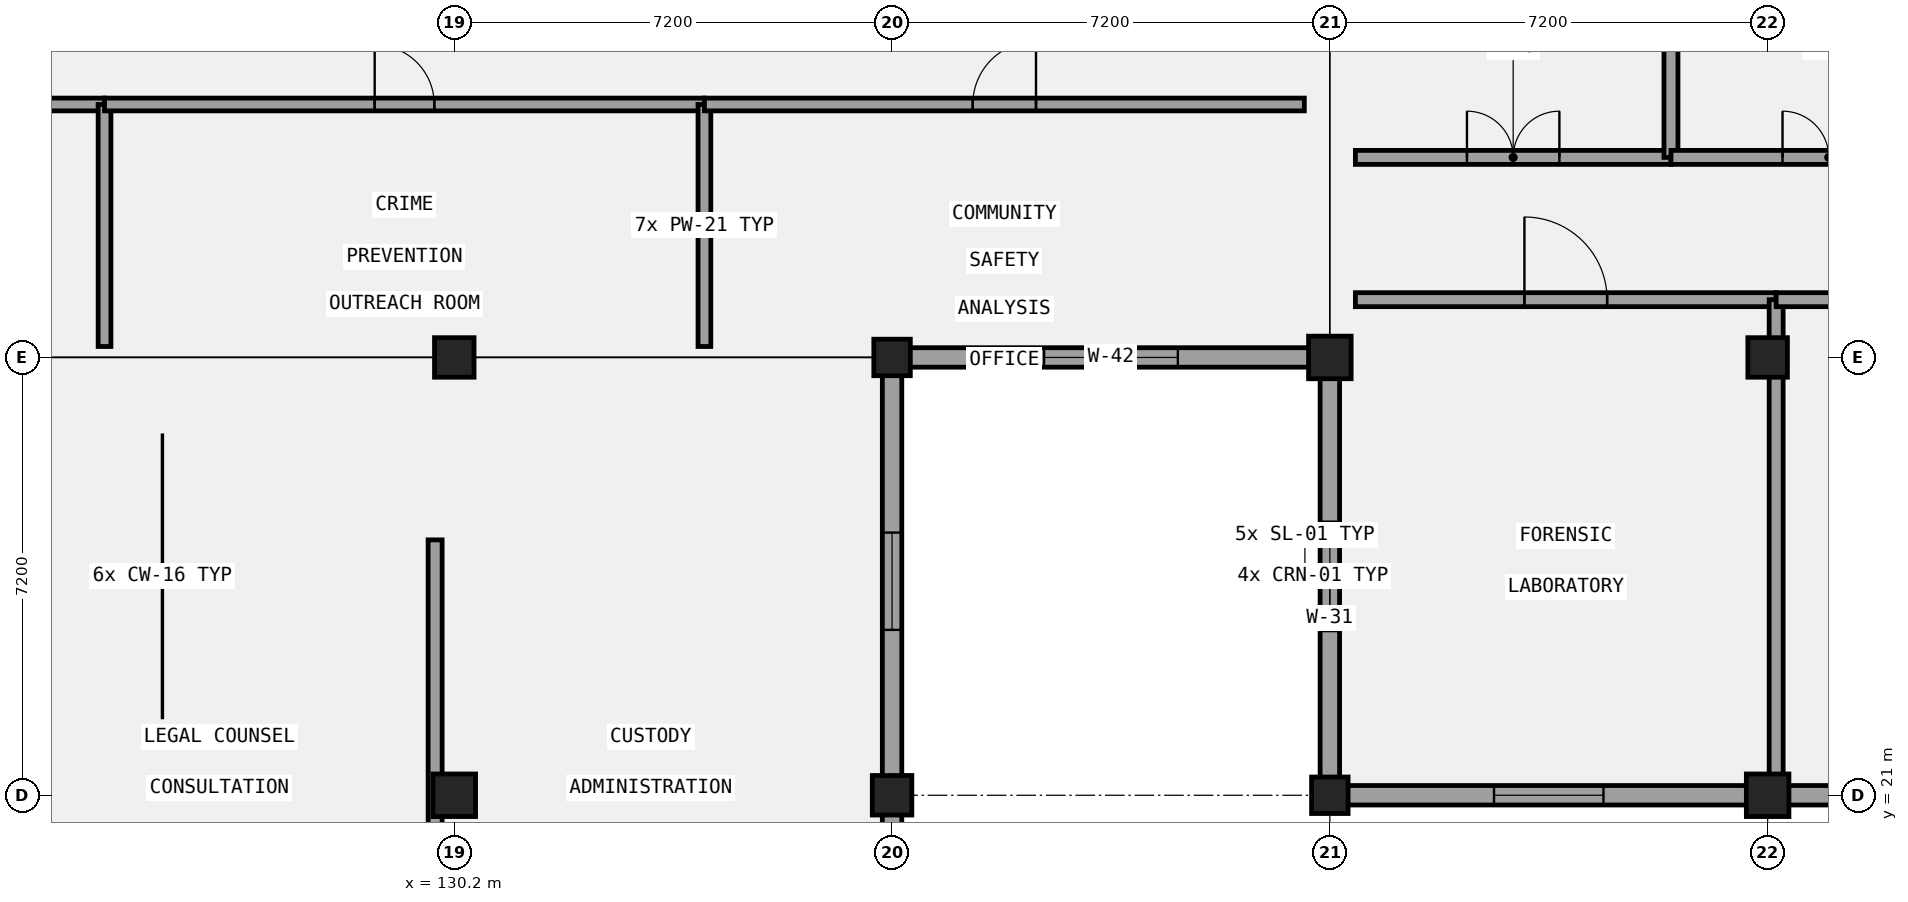
"""IFC4 building model, lengths in metres.
Left out: names, types, materials, properties, quantities, classifications, styles, units other than length and angle.
Written with IfcOpenShell. Run it as: python <this file> out.ifc"""

import sys

from ifc_helpers import new_model, si_unit, direction, frame, frame_2d, origin, origin_2d, place, context, subcontext, project, spatial, rectangle, extrude, element, fill, save


model = new_model("IFC4")
c1 = context("Model", 3, precision=1e-05, world=origin(), true_north=direction((0.0, 1.0)))
c2 = subcontext(c1, "Body", "Model", "MODEL_VIEW")
j1 = project(units=[si_unit("LENGTHUNIT", "METRE"), si_unit("PLANEANGLEUNIT", "RADIAN")], contexts=[c1])
p1 = place(None, origin())
s1 = spatial("IfcSite", under=j1, at=p1, CompositionType="ELEMENT")
p2 = place(p1, origin())
s2 = spatial("IfcBuilding", under=s1, at=p2, CompositionType="ELEMENT")
p3 = place(p2, frame((0.0, 0.0, 9.6)))
s3 = spatial("IfcBuildingStorey", under=s2, at=p3, CompositionType="ELEMENT", Elevation=9.6)
p4 = place(p3, frame((130.2, 21.0, 0.0), z_axis=(0.0, 0.0, 1.0), x_axis=(1.0, 0.0, 0.0)))
e1 = element("IfcColumn", 1, at=p4, inside=s3, PredefinedType="COLUMN", context=c2, shape_type="SweptSolid", body=[
    extrude(rectangle(XDim=0.7, YDim=0.7, at=origin_2d()), origin(), (0.0, 0.0, 1.0), 4.2),
])
for number, where, z_axis, x_axis in (
    (2, (130.2, 28.2, 0.0), (0.0, 0.0, 1.0), (1.0, 0.0, 0.0)),
    (3, (137.4, 21.0, 0.0), (0.0, 0.0, 1.0), (1.0, 0.0, 0.0)),
):
    element("IfcColumn", number, at=place(p3, frame(where, z_axis=z_axis, x_axis=x_axis)), inside=s3, PredefinedType="COLUMN", context=c2, shape_type="SweptSolid", body=[
        extrude(rectangle(XDim=0.65, YDim=0.65, at=origin_2d()), origin(), (0.0, 0.0, 1.0), 4.2),
    ])
for number, where, z_axis, x_axis in (
    (4, (137.4, 28.2, 0.0), (0.0, 0.0, 1.0), (1.0, 0.0, 0.0)),
    (5, (144.6, 21.0, 0.0), (0.0, 0.0, 1.0), (1.0, 0.0, 0.0)),
):
    element("IfcColumn", number, at=place(p3, frame(where, z_axis=z_axis, x_axis=x_axis)), inside=s3, PredefinedType="COLUMN", context=c2, shape_type="SweptSolid", body=[
        extrude(rectangle(XDim=0.6, YDim=0.6, at=origin_2d()), origin(), (0.0, 0.0, 1.0), 4.2),
    ])
for number, where, z_axis, x_axis in (
    (6, (144.6, 28.2, 0.0), (0.0, 0.0, 1.0), (1.0, 0.0, 0.0)),
    (7, (151.8, 21.0, 0.0), (0.0, 0.0, 1.0), (1.0, 0.0, 0.0)),
):
    element("IfcColumn", number, at=place(p3, frame(where, z_axis=z_axis, x_axis=x_axis)), inside=s3, PredefinedType="COLUMN", context=c2, shape_type="SweptSolid", body=[
        extrude(rectangle(XDim=0.7, YDim=0.7, at=origin_2d()), origin(), (0.0, 0.0, 1.0), 4.2),
    ])
p5 = place(p3, frame((151.8, 28.2, 0.0), z_axis=(0.0, 0.0, 1.0), x_axis=(1.0, 0.0, 0.0)))
e8 = element("IfcColumn", 8, at=p5, inside=s3, PredefinedType="COLUMN", context=c2, shape_type="SweptSolid", body=[
    extrude(rectangle(XDim=0.65, YDim=0.65, at=origin_2d()), origin(), (0.0, 0.0, 1.0), 4.2),
])
p6 = place(p3, frame((137.4, 6.76, 0.0), z_axis=(0.0, 0.0, 1.0), x_axis=(0.0, 1.0, 0.0)))
e9 = element("IfcWall", 9, at=p6, inside=s3, PredefinedType="SOLIDWALL", context=c2, shape_type="SweptSolid", body=[
    extrude(rectangle(XDim=21.28, YDim=0.32, at=frame_2d((10.64, 0.0))), origin(), (0.0, 0.0, 1.0), 3.29),
])
p7 = place(p6, frame((2.72, 0.0, 1.0)))
e10 = element("IfcOpeningElement", 10, at=p7, cuts=e9, PredefinedType="OPENING", context=c2, shape_type="SweptSolid", body=[
    extrude(rectangle(XDim=1.6, YDim=1.65, at=frame_2d((0.8, 0.825))), frame((0.0, 0.17, 0.0), z_axis=(0.0, -1.0, 0.0), x_axis=(1.0, 0.0, 0.0)), (0.0, 0.0, 1.0), 0.34),
])
p8 = place(p6, frame((9.84, 0.0, 1.0)))
e11 = element("IfcOpeningElement", 11, at=p8, cuts=e9, PredefinedType="OPENING", context=c2, shape_type="SweptSolid", body=[
    extrude(rectangle(XDim=1.6, YDim=1.65, at=frame_2d((0.8, 0.825))), frame((0.0, 0.17, 0.0), z_axis=(0.0, -1.0, 0.0), x_axis=(1.0, 0.0, 0.0)), (0.0, 0.0, 1.0), 0.34),
])
p9 = place(p6, frame((16.96, 0.0, 1.0)))
e12 = element("IfcOpeningElement", 12, at=p9, cuts=e9, PredefinedType="OPENING", context=c2, shape_type="SweptSolid", body=[
    extrude(rectangle(XDim=1.6, YDim=1.65, at=frame_2d((0.8, 0.825))), frame((0.0, 0.17, 0.0), z_axis=(0.0, -1.0, 0.0), x_axis=(1.0, 0.0, 0.0)), (0.0, 0.0, 1.0), 0.34),
])
p10 = place(p3, frame((137.24, 28.2, 0.0), z_axis=(0.0, 0.0, 1.0), x_axis=(1.0, 0.0, 0.0)))
e13 = element("IfcWall", 13, at=p10, inside=s3, PredefinedType="SOLIDWALL", context=c2, shape_type="SweptSolid", body=[
    extrude(rectangle(XDim=7.52, YDim=0.32, at=frame_2d((3.76, 0.0))), origin(), (0.0, 0.0, 1.0), 2.94),
])
p11 = place(p10, frame((2.66, 0.0, 1.0)))
e14 = element("IfcOpeningElement", 14, at=p11, cuts=e13, PredefinedType="OPENING", context=c2, shape_type="SweptSolid", body=[
    extrude(rectangle(XDim=2.2, YDim=1.65, at=frame_2d((1.1, 0.825))), frame((0.0, 0.17, 0.0), z_axis=(0.0, -1.0, 0.0), x_axis=(1.0, 0.0, 0.0)), (0.0, 0.0, 1.0), 0.34),
])
p12 = place(p3, frame((144.6, 28.04, 0.0), z_axis=(0.0, 0.0, 1.0), x_axis=(0.0, -1.0, 0.0)))
e15 = element("IfcWall", 15, at=p12, inside=s3, PredefinedType="SOLIDWALL", context=c2, shape_type="SweptSolid", body=[
    extrude(rectangle(XDim=6.88, YDim=0.32, at=frame_2d((3.44, 0.0))), origin(), (0.0, 0.0, 1.0), 3.19),
])
p13 = place(p12, frame((2.54, 0.0, 1.0)))
e16 = element("IfcOpeningElement", 16, at=p13, cuts=e15, PredefinedType="OPENING", context=c2, shape_type="SweptSolid", body=[
    extrude(rectangle(XDim=1.8, YDim=1.4, at=frame_2d((0.9, 0.7))), frame((0.0, 0.17, 0.0), z_axis=(0.0, -1.0, 0.0), x_axis=(1.0, 0.0, 0.0)), (0.0, 0.0, 1.0), 0.34),
])
p14 = place(p3, frame((144.44, 21.0, 0.0), z_axis=(0.0, 0.0, 1.0), x_axis=(1.0, 0.0, 0.0)))
e17 = element("IfcWall", 17, at=p14, inside=s3, PredefinedType="SOLIDWALL", context=c2, shape_type="SweptSolid", body=[
    extrude(rectangle(XDim=21.92, YDim=0.32, at=frame_2d((10.96, 0.0))), origin(), (0.0, 0.0, 1.0), 3.29),
])
p15 = place(p14, frame((2.86, 0.0, 1.0)))
e18 = element("IfcOpeningElement", 18, at=p15, cuts=e17, PredefinedType="OPENING", context=c2, shape_type="SweptSolid", body=[
    extrude(rectangle(XDim=1.8, YDim=1.65, at=frame_2d((0.9, 0.825))), frame((0.0, 0.17, 0.0), z_axis=(0.0, -1.0, 0.0), x_axis=(1.0, 0.0, 0.0)), (0.0, 0.0, 1.0), 0.34),
])
p16 = place(p14, frame((10.06, 0.0, 1.0)))
e19 = element("IfcOpeningElement", 19, at=p16, cuts=e17, PredefinedType="OPENING", context=c2, shape_type="SweptSolid", body=[
    extrude(rectangle(XDim=1.8, YDim=1.65, at=frame_2d((0.9, 0.825))), frame((0.0, 0.17, 0.0), z_axis=(0.0, -1.0, 0.0), x_axis=(1.0, 0.0, 0.0)), (0.0, 0.0, 1.0), 0.34),
])
p17 = place(p14, frame((17.26, 0.0, 1.0)))
e20 = element("IfcOpeningElement", 20, at=p17, cuts=e17, PredefinedType="OPENING", context=c2, shape_type="SweptSolid", body=[
    extrude(rectangle(XDim=1.8, YDim=1.65, at=frame_2d((0.9, 0.825))), frame((0.0, 0.17, 0.0), z_axis=(0.0, -1.0, 0.0), x_axis=(1.0, 0.0, 0.0)), (0.0, 0.0, 1.0), 0.34),
])
p18 = place(p3, frame((114.582, 32.36, 0.0), z_axis=(0.0, 0.0, 1.0), x_axis=(1.0, 0.0, 0.0)))
e21 = element("IfcWall", 21, at=p18, inside=s3, PredefinedType="PARTITIONING", context=c2, shape_type="SweptSolid", body=[
    extrude(rectangle(XDim=9.866, YDim=0.21, at=frame_2d((4.933, 0.0))), origin(), (0.0, 0.0, 1.0), 3.94),
])
p19 = place(p18, frame((4.443, 0.0, 0.0)))
e22 = element("IfcOpeningElement", 22, at=p19, cuts=e21, PredefinedType="OPENING", context=c2, shape_type="SweptSolid", body=[
    extrude(rectangle(XDim=0.98, YDim=2.22, at=frame_2d((0.49, 1.11))), frame((0.0, 0.115, 0.0), z_axis=(0.0, -1.0, 0.0), x_axis=(1.0, 0.0, 0.0)), (0.0, 0.0, 1.0), 0.23),
])
p20 = place(p3, frame((124.448, 28.38, 0.0), z_axis=(0.0, 0.0, 1.0), x_axis=(0.0, 1.0, 0.0)))
e23 = element("IfcWall", 23, at=p20, inside=s3, PredefinedType="PARTITIONING", context=c2, shape_type="SweptSolid", body=[
    extrude(rectangle(XDim=3.98, YDim=0.21, at=frame_2d((1.99, 0.0))), origin(), (0.0, 0.0, 1.0), 3.94),
])
p21 = place(p3, frame((124.448, 32.36, 0.0), z_axis=(0.0, 0.0, 1.0), x_axis=(1.0, 0.0, 0.0)))
e24 = element("IfcWall", 24, at=p21, inside=s3, PredefinedType="PARTITIONING", context=c2, shape_type="SweptSolid", body=[
    extrude(rectangle(XDim=9.866, YDim=0.21, at=frame_2d((4.933, 0.0))), origin(), (0.0, 0.0, 1.0), 3.94),
])
p22 = place(p21, frame((4.443, 0.0, 0.0)))
e25 = element("IfcOpeningElement", 25, at=p22, cuts=e24, PredefinedType="OPENING", context=c2, shape_type="SweptSolid", body=[
    extrude(rectangle(XDim=0.98, YDim=2.35, at=frame_2d((0.49, 1.175))), frame((0.0, 0.115, 0.0), z_axis=(0.0, -1.0, 0.0), x_axis=(1.0, 0.0, 0.0)), (0.0, 0.0, 1.0), 0.23),
])
p23 = place(p3, frame((134.314, 28.38, 0.0), z_axis=(0.0, 0.0, 1.0), x_axis=(0.0, 1.0, 0.0)))
e26 = element("IfcWall", 26, at=p23, inside=s3, PredefinedType="PARTITIONING", context=c2, shape_type="SweptSolid", body=[
    extrude(rectangle(XDim=3.98, YDim=0.21, at=frame_2d((1.99, 0.0))), origin(), (0.0, 0.0, 1.0), 3.94),
])
p24 = place(p3, frame((134.314, 32.36, 0.0), z_axis=(0.0, 0.0, 1.0), x_axis=(1.0, 0.0, 0.0)))
e27 = element("IfcWall", 27, at=p24, inside=s3, PredefinedType="PARTITIONING", context=c2, shape_type="SweptSolid", body=[
    extrude(rectangle(XDim=9.866, YDim=0.21, at=frame_2d((4.933, 0.0))), origin(), (0.0, 0.0, 1.0), 3.94),
])
p25 = place(p24, frame((4.413, 0.0, 0.0)))
e28 = element("IfcOpeningElement", 28, at=p25, cuts=e27, PredefinedType="OPENING", context=c2, shape_type="SweptSolid", body=[
    extrude(rectangle(XDim=1.04, YDim=2.1, at=frame_2d((0.52, 1.05))), frame((0.0, 0.115, 0.0), z_axis=(0.0, -1.0, 0.0), x_axis=(1.0, 0.0, 0.0)), (0.0, 0.0, 1.0), 0.23),
])
p26 = place(p3, frame((145.02, 29.15, 0.0), z_axis=(0.0, 0.0, 1.0), x_axis=(1.0, 0.0, 0.0)))
e29 = element("IfcWall", 29, at=p26, inside=s3, PredefinedType="PARTITIONING", context=c2, shape_type="SweptSolid", body=[
    extrude(rectangle(XDim=6.92, YDim=0.23, at=frame_2d((3.46, 0.0))), origin(), (0.0, 0.0, 1.0), 3.94),
])
p27 = place(p26, frame((2.78, 0.0, 0.0)))
e30 = element("IfcOpeningElement", 30, at=p27, cuts=e29, PredefinedType="OPENING", context=c2, shape_type="SweptSolid", body=[
    extrude(rectangle(XDim=1.36, YDim=2.1, at=frame_2d((0.68, 1.05))), frame((0.0, 0.125, 0.0), z_axis=(0.0, -1.0, 0.0), x_axis=(1.0, 0.0, 0.0)), (0.0, 0.0, 1.0), 0.25),
])
p28 = place(p3, frame((151.94, 21.18, 0.0), z_axis=(0.0, 0.0, 1.0), x_axis=(0.0, 1.0, 0.0)))
e31 = element("IfcWall", 31, at=p28, inside=s3, PredefinedType="PARTITIONING", context=c2, shape_type="SweptSolid", body=[
    extrude(rectangle(XDim=7.97, YDim=0.23, at=frame_2d((3.985, 0.0))), origin(), (0.0, 0.0, 1.0), 3.14),
])
p29 = place(p3, frame((151.94, 29.15, 0.0), z_axis=(0.0, 0.0, 1.0), x_axis=(1.0, 0.0, 0.0)))
e32 = element("IfcWall", 32, at=p29, inside=s3, PredefinedType="PARTITIONING", context=c2, shape_type="SweptSolid", body=[
    extrude(rectangle(XDim=6.92, YDim=0.23, at=frame_2d((3.46, 0.0))), origin(), (0.0, 0.0, 1.0), 3.94),
])
p30 = place(p29, frame((2.78, 0.0, 0.0)))
e33 = element("IfcOpeningElement", 33, at=p30, cuts=e32, PredefinedType="OPENING", context=c2, shape_type="SweptSolid", body=[
    extrude(rectangle(XDim=1.36, YDim=2.22, at=frame_2d((0.68, 1.11))), frame((0.0, 0.125, 0.0), z_axis=(0.0, -1.0, 0.0), x_axis=(1.0, 0.0, 0.0)), (0.0, 0.0, 1.0), 0.25),
])
p31 = place(p3, frame((145.02, 31.49, 0.0), z_axis=(0.0, 0.0, 1.0), x_axis=(1.0, 0.0, 0.0)))
e34 = element("IfcWall", 34, at=p31, inside=s3, PredefinedType="PARTITIONING", context=c2, shape_type="SweptSolid", body=[
    extrude(rectangle(XDim=5.19, YDim=0.23, at=frame_2d((2.595, 0.0))), origin(), (0.0, 0.0, 1.0), 3.39),
])
p32 = place(p31, frame((1.835, 0.0, 0.0)))
e35 = element("IfcOpeningElement", 35, at=p32, cuts=e34, PredefinedType="OPENING", context=c2, shape_type="SweptSolid", body=[
    extrude(rectangle(XDim=1.52, YDim=2.1, at=frame_2d((0.76, 1.05))), frame((0.0, 0.125, 0.0), z_axis=(0.0, -1.0, 0.0), x_axis=(1.0, 0.0, 0.0)), (0.0, 0.0, 1.0), 0.25),
])
p33 = place(p3, frame((150.21, 31.49, 0.0), z_axis=(0.0, 0.0, 1.0), x_axis=(0.0, 1.0, 0.0)))
e36 = element("IfcWall", 36, at=p33, inside=s3, PredefinedType="PARTITIONING", context=c2, shape_type="SweptSolid", body=[
    extrude(rectangle(XDim=8.11, YDim=0.23, at=frame_2d((4.055, 0.0))), origin(), (0.0, 0.0, 1.0), 3.94),
])
p34 = place(p3, frame((150.21, 31.49, 0.0), z_axis=(0.0, 0.0, 1.0), x_axis=(1.0, 0.0, 0.0)))
e37 = element("IfcWall", 37, at=p34, inside=s3, PredefinedType="PARTITIONING", context=c2, shape_type="SweptSolid", body=[
    extrude(rectangle(XDim=5.19, YDim=0.23, at=frame_2d((2.595, 0.0))), origin(), (0.0, 0.0, 1.0), 3.39),
])
p35 = place(p34, frame((1.835, 0.0, 0.0)))
e38 = element("IfcOpeningElement", 38, at=p35, cuts=e37, PredefinedType="OPENING", context=c2, shape_type="SweptSolid", body=[
    extrude(rectangle(XDim=1.52, YDim=2.22, at=frame_2d((0.76, 1.11))), frame((0.0, 0.125, 0.0), z_axis=(0.0, -1.0, 0.0), x_axis=(1.0, 0.0, 0.0)), (0.0, 0.0, 1.0), 0.25),
])
p36 = place(p3, frame((129.885, 17.28, 0.0), z_axis=(0.0, 0.0, 1.0), x_axis=(0.0, 1.0, 0.0)))
e39 = element("IfcWall", 39, at=p36, inside=s3, PredefinedType="PARTITIONING", context=c2, shape_type="SweptSolid", body=[
    extrude(rectangle(XDim=7.92, YDim=0.23, at=frame_2d((3.96, 0.0))), origin(), (0.0, 0.0, 1.0), 3.34),
])
p37 = place(p9, origin())
e40 = element("IfcWindow", 40, at=p37, inside=s3, PartitioningType="SINGLE_PANEL", PredefinedType="WINDOW", context=c2, shape_type="SweptSolid", body=[
    extrude(rectangle(XDim=1.6, YDim=1.65, at=frame_2d((0.8, 0.825))), frame((0.0, 0.03, 0.0), z_axis=(0.0, -1.0, 0.0), x_axis=(1.0, 0.0, 0.0)), (0.0, 0.0, 1.0), 0.06),
])
fill(e12, e40)
p38 = place(p11, origin())
e41 = element("IfcWindow", 41, at=p38, inside=s3, PartitioningType="SINGLE_PANEL", PredefinedType="WINDOW", context=c2, shape_type="SweptSolid", body=[
    extrude(rectangle(XDim=2.2, YDim=1.65, at=frame_2d((1.1, 0.825))), frame((0.0, 0.03, 0.0), z_axis=(0.0, -1.0, 0.0), x_axis=(1.0, 0.0, 0.0)), (0.0, 0.0, 1.0), 0.06),
])
fill(e14, e41)
p39 = place(p13, origin())
e42 = element("IfcWindow", 42, at=p39, inside=s3, PartitioningType="SINGLE_PANEL", PredefinedType="WINDOW", context=c2, shape_type="SweptSolid", body=[
    extrude(rectangle(XDim=1.8, YDim=1.4, at=frame_2d((0.9, 0.7))), frame((0.0, 0.03, 0.0), z_axis=(0.0, -1.0, 0.0), x_axis=(1.0, 0.0, 0.0)), (0.0, 0.0, 1.0), 0.06),
])
fill(e16, e42)
p40 = place(p15, origin())
e43 = element("IfcWindow", 43, at=p40, inside=s3, PartitioningType="SINGLE_PANEL", PredefinedType="WINDOW", context=c2, shape_type="SweptSolid", body=[
    extrude(rectangle(XDim=1.8, YDim=1.65, at=frame_2d((0.9, 0.825))), frame((0.0, 0.03, 0.0), z_axis=(0.0, -1.0, 0.0), x_axis=(1.0, 0.0, 0.0)), (0.0, 0.0, 1.0), 0.06),
])
fill(e18, e43)
p41 = place(p22, frame((0.98, 0.0, 0.0), z_axis=(0.0, 0.0, 1.0), x_axis=(-1.0, 0.0, 0.0)))
e44 = element("IfcDoor", 44, at=p41, inside=s3, OperationType="SINGLE_SWING_LEFT", PredefinedType="DOOR", context=c2, shape_type="SweptSolid", body=[
    extrude(rectangle(XDim=0.98, YDim=2.35, at=frame_2d((0.49, 1.175))), frame((0.0, 0.025, 0.0), z_axis=(0.0, -1.0, 0.0), x_axis=(1.0, 0.0, 0.0)), (0.0, 0.0, 1.0), 0.05),
])
fill(e25, e44)
p42 = place(p25, frame((1.04, 0.0, 0.0), z_axis=(0.0, 0.0, 1.0), x_axis=(-1.0, 0.0, 0.0)))
e45 = element("IfcDoor", 45, at=p42, inside=s3, OperationType="SINGLE_SWING_RIGHT", PredefinedType="DOOR", context=c2, shape_type="SweptSolid", body=[
    extrude(rectangle(XDim=1.04, YDim=2.1, at=frame_2d((0.52, 1.05))), frame((0.0, 0.025, 0.0), z_axis=(0.0, -1.0, 0.0), x_axis=(1.0, 0.0, 0.0)), (0.0, 0.0, 1.0), 0.05),
])
fill(e28, e45)
p43 = place(p27, frame((1.36, 0.0, 0.0), z_axis=(0.0, 0.0, 1.0), x_axis=(-1.0, 0.0, 0.0)))
e46 = element("IfcDoor", 46, at=p43, inside=s3, OperationType="SINGLE_SWING_LEFT", PredefinedType="DOOR", context=c2, shape_type="SweptSolid", body=[
    extrude(rectangle(XDim=1.36, YDim=2.1, at=frame_2d((0.68, 1.05))), frame((0.0, 0.025, 0.0), z_axis=(0.0, -1.0, 0.0), x_axis=(1.0, 0.0, 0.0)), (0.0, 0.0, 1.0), 0.05),
])
fill(e30, e46)
p44 = place(p32, origin())
e47 = element("IfcDoor", 47, at=p44, inside=s3, OperationType="DOUBLE_DOOR_SINGLE_SWING", PredefinedType="DOOR", context=c2, shape_type="SweptSolid", body=[
    extrude(rectangle(XDim=1.52, YDim=2.1, at=frame_2d((0.76, 1.05))), frame((0.0, 0.025, 0.0), z_axis=(0.0, -1.0, 0.0), x_axis=(1.0, 0.0, 0.0)), (0.0, 0.0, 1.0), 0.05),
])
fill(e35, e47)
p45 = place(p35, origin())
e48 = element("IfcDoor", 48, at=p45, inside=s3, OperationType="DOUBLE_DOOR_SINGLE_SWING", PredefinedType="DOOR", context=c2, shape_type="SweptSolid", body=[
    extrude(rectangle(XDim=1.52, YDim=2.22, at=frame_2d((0.76, 1.11))), frame((0.0, 0.025, 0.0), z_axis=(0.0, -1.0, 0.0), x_axis=(1.0, 0.0, 0.0)), (0.0, 0.0, 1.0), 0.05),
])
fill(e38, e48)
save(model, sys.argv[1])
